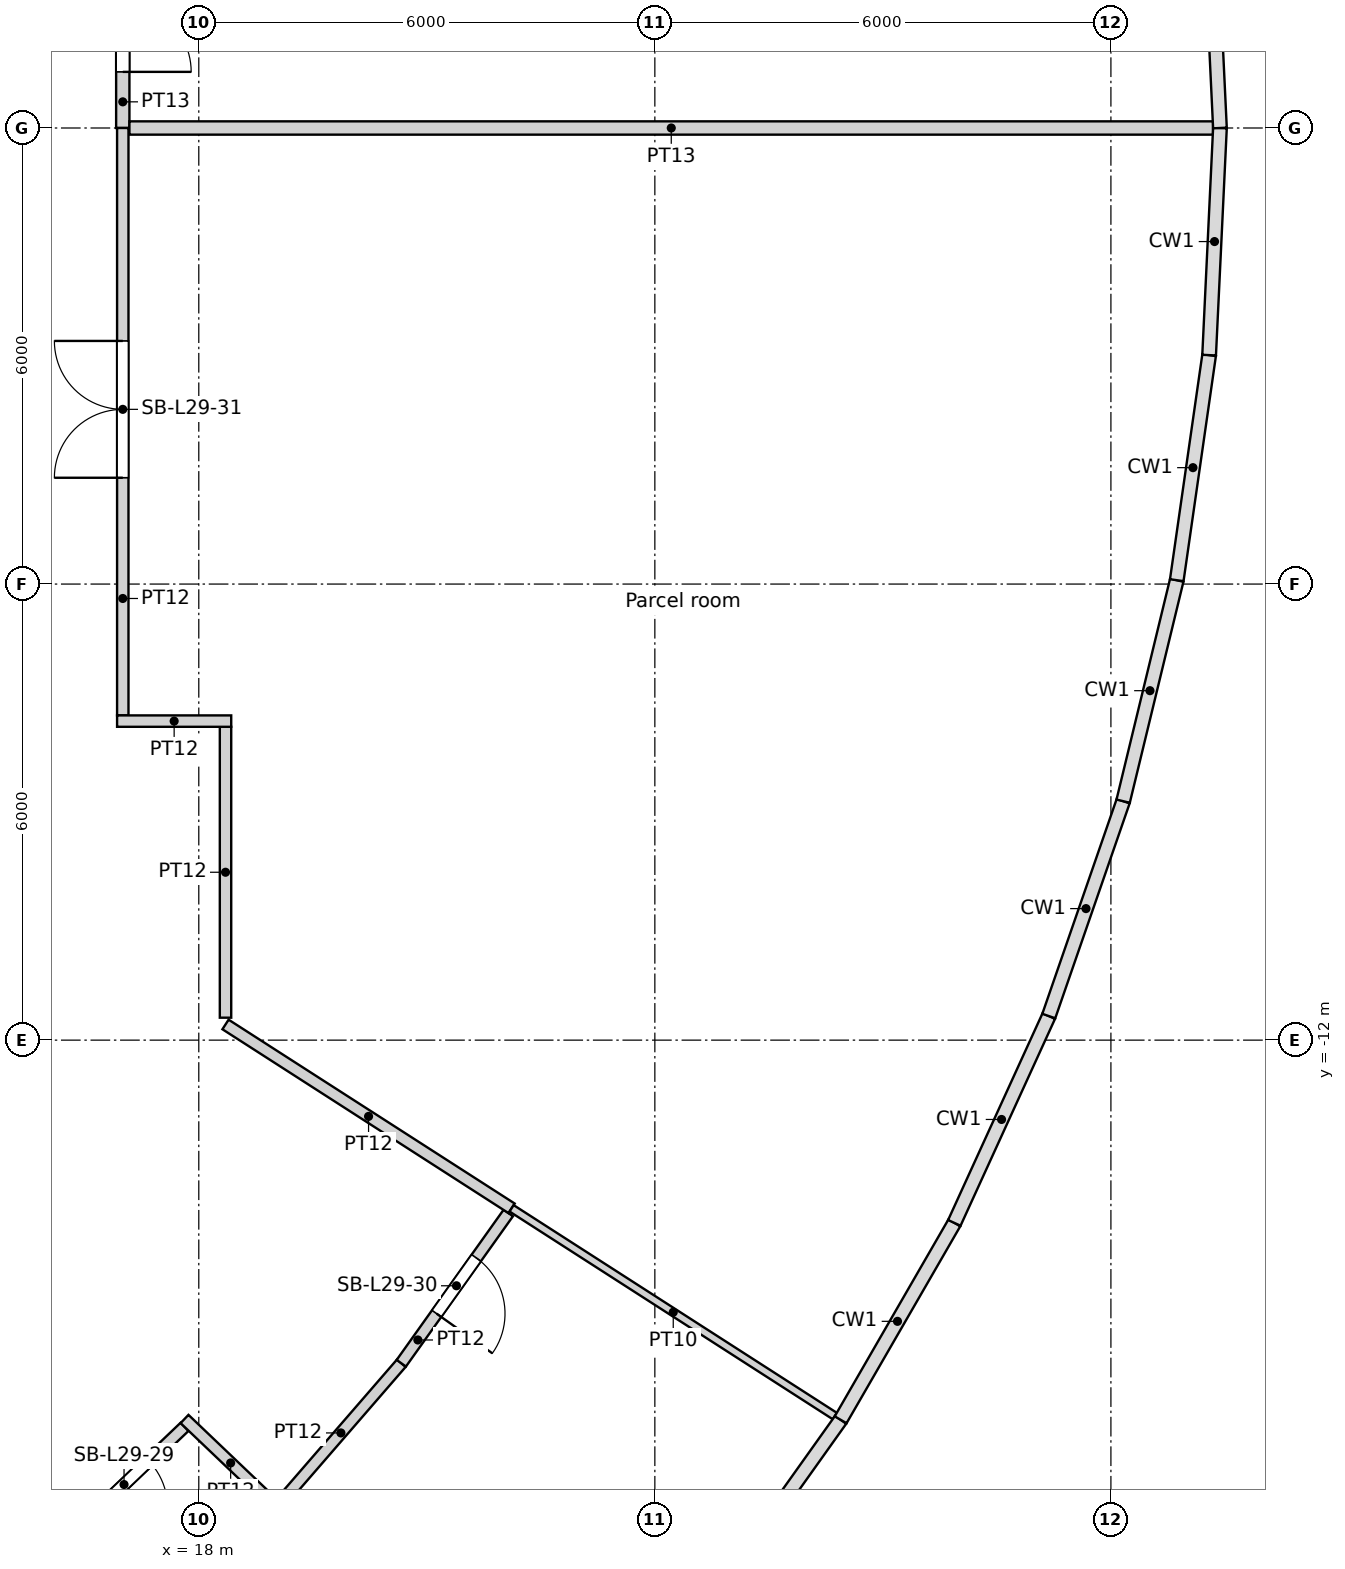
"""IFC4 building model, lengths in metres.
Left out: names, types, materials, properties, quantities, classifications, styles, units other than length and angle.
Written with IfcOpenShell. Run it as: python <this file> out.ifc"""

import sys

from ifc_helpers import new_model, si_unit, direction, frame, frame_2d, origin, origin_2d, place, context, subcontext, project, spatial, rectangle, circle, extrude, element, fill, save


model = new_model("IFC4")
c1 = context("Model", 3, precision=1e-05, world=origin(), true_north=direction((0.0, 1.0)))
c2 = subcontext(c1, "Body", "Model", "MODEL_VIEW")
j1 = project(units=[si_unit("LENGTHUNIT", "METRE"), si_unit("PLANEANGLEUNIT", "RADIAN")], contexts=[c1])
p1 = place(None, origin())
s1 = spatial("IfcSite", under=j1, at=p1, CompositionType="ELEMENT")
p2 = place(p1, origin())
s2 = spatial("IfcBuilding", under=s1, at=p2, CompositionType="ELEMENT")
p3 = place(p2, frame((0.0, 0.0, 114.6)))
s3 = spatial("IfcBuildingStorey", under=s2, at=p3, CompositionType="ELEMENT", Elevation=114.6)
for number, where, z_axis, x_axis in (
    (1, (30.275, 0.0, 0.0), (0.0, 0.0, 1.0), (1.0, 0.0, 0.0)),
    (2, (25.469, -16.368, 0.0), (0.0, 0.0, 1.0), (1.0, 0.0, 0.0)),
    (3, (28.106, -11.252, 0.0), (0.0, 0.0, 1.0), (1.0, 0.0, 0.0)),
    (4, (29.728, -5.729, 0.0), (0.0, 0.0, 1.0), (1.0, 0.0, 0.0)),
):
    element("IfcColumn", number, at=place(p3, frame(where, z_axis=z_axis, x_axis=x_axis)), inside=s3, PredefinedType="COLUMN", context=c2, shape_type="SweptSolid", body=[
        extrude(circle(Radius=0.6, at=origin_2d()), origin(), (0.0, 0.0, 1.0), 5.4),
    ])
for number, where, z_axis, x_axis in (
    (5, (24.548, 0.0, 0.0), (0.0, 0.0, 1.0), (1.0, 0.0, 0.0)),
    (6, (18.805, -15.779, 0.0), (0.0, 0.0, 1.0), (1.0, 0.0, 0.0)),
    (7, (21.937, -11.017, 0.0), (0.0, 0.0, 1.0), (1.0, 0.0, 0.0)),
    (8, (23.886, -5.661, 0.0), (0.0, 0.0, 1.0), (1.0, 0.0, 0.0)),
):
    element("IfcColumn", number, at=place(p3, frame(where, z_axis=z_axis, x_axis=x_axis)), inside=s3, PredefinedType="COLUMN", context=c2, shape_type="SweptSolid", body=[
        extrude(circle(Radius=0.65, at=origin_2d()), origin(), (0.0, 0.0, 1.0), 5.4),
    ])
for number, where, z_axis, x_axis in (
    (9, (18.822, 0.0, 0.0), (0.0, 0.0, 1.0), (1.0, 0.0, 0.0)),
    (10, (15.552, -10.603, 0.0), (0.0, 0.0, 1.0), (1.0, 0.0, 0.0)),
    (11, (17.986, -5.548, 0.0), (0.0, 0.0, 1.0), (1.0, 0.0, 0.0)),
):
    element("IfcColumn", number, at=place(p3, frame(where, z_axis=z_axis, x_axis=x_axis)), inside=s3, PredefinedType="COLUMN", context=c2, shape_type="SweptSolid", body=[
        extrude(circle(Radius=0.7, at=origin_2d()), origin(), (0.0, 0.0, 1.0), 5.4),
    ])
p4 = place(p3, frame((17.812, -17.088, 0.0), z_axis=(0.0, 0.0, 1.0), x_axis=(-0.723759987923, -0.690051795071, 0.0)))
e12 = element("IfcWall", 12, at=p4, inside=s3, PredefinedType="PARTITIONING", context=c2, shape_type="SweptSolid", body=[
    extrude(rectangle(XDim=2.274, YDim=0.15, at=frame_2d((1.137, 0.0))), origin(), (0.0, 0.0, 1.0), 4.0),
])
p5 = place(p4, frame((0.65, 0.0, 0.0)))
e13 = element("IfcOpeningElement", 13, at=p5, cuts=e12, PredefinedType="OPENING", context=c2, shape_type="SweptSolid", body=[
    extrude(rectangle(XDim=0.9, YDim=2.1, at=frame_2d((0.45, 1.05))), frame((0.0, 0.075, 0.0), z_axis=(0.0, -1.0, 0.0), x_axis=(1.0, 0.0, 0.0)), (0.0, 0.0, 1.0), 0.15),
])
p6 = place(p3, frame((17.0, 0.0, 0.0), z_axis=(0.0, 0.0, 1.0), x_axis=(0.0, -1.0, 0.0)))
e14 = element("IfcWall", 14, at=p6, inside=s3, PredefinedType="PARTITIONING", context=c2, shape_type="SweptSolid", body=[
    extrude(rectangle(XDim=7.728, YDim=0.15, at=frame_2d((3.864, 0.0))), origin(), (0.0, 0.0, 1.0), 4.0),
])
p7 = place(p6, frame((2.802, 0.0, 0.0)))
e15 = element("IfcOpeningElement", 15, at=p7, cuts=e14, PredefinedType="OPENING", context=c2, shape_type="SweptSolid", body=[
    extrude(rectangle(XDim=1.8, YDim=2.4, at=frame_2d((0.9, 1.2))), frame((0.0, 0.075, 0.0), z_axis=(0.0, -1.0, 0.0), x_axis=(1.0, 0.0, 0.0)), (0.0, 0.0, 1.0), 0.15),
])
p8 = place(p3, frame((17.0, 3.188, 0.0), z_axis=(0.0, 0.0, 1.0), x_axis=(0.0, -1.0, 0.0)))
e16 = element("IfcWall", 16, at=p8, inside=s3, PredefinedType="PARTITIONING", context=c2, shape_type="SweptSolid", body=[
    extrude(rectangle(XDim=3.188, YDim=0.175, at=frame_2d((1.594, 0.0))), origin(), (0.0, 0.0, 1.0), 4.0),
])
p9 = place(p8, frame((0.649, 0.0, 0.0)))
e17 = element("IfcOpeningElement", 17, at=p9, cuts=e16, PredefinedType="OPENING", context=c2, shape_type="SweptSolid", body=[
    extrude(rectangle(XDim=1.8, YDim=2.4, at=frame_2d((0.9, 1.2))), frame((0.0, 0.087, 0.0), z_axis=(0.0, -1.0, 0.0), x_axis=(1.0, 0.0, 0.0)), (0.0, 0.0, 1.0), 0.175),
])
p10 = place(p3, frame((18.352, -11.705, 0.0), z_axis=(0.0, 0.0, 1.0), x_axis=(0.0, 1.0, 0.0)))
e18 = element("IfcWall", 18, at=p10, inside=s3, PredefinedType="PARTITIONING", context=c2, shape_type="SweptSolid", body=[
    extrude(rectangle(XDim=3.827, YDim=0.15, at=frame_2d((1.913, 0.0))), origin(), (0.0, 0.0, 1.0), 4.0),
])
p11 = place(p3, frame((18.427, -7.803, 0.0), z_axis=(0.0, 0.0, 1.0), x_axis=(-1.0, 0.0, 0.0)))
e19 = element("IfcWall", 19, at=p11, inside=s3, PredefinedType="PARTITIONING", context=c2, shape_type="SweptSolid", body=[
    extrude(rectangle(XDim=1.501, YDim=0.15, at=frame_2d((0.751, 0.0))), origin(), (0.0, 0.0, 1.0), 4.0),
])
p12 = place(p3, frame((19.026, -18.141, 0.0), z_axis=(0.0, 0.0, 1.0), x_axis=(-0.723652981841, 0.69016401085, 0.0)))
e20 = element("IfcWall", 20, at=p12, inside=s3, PredefinedType="PARTITIONING", context=c2, shape_type="SweptSolid", body=[
    extrude(rectangle(XDim=1.677, YDim=0.15, at=frame_2d((0.838, 0.0))), origin(), (0.0, 0.0, 1.0), 4.0),
])
p13 = place(p3, frame((19.075, -18.085, 0.0), z_axis=(0.0, 0.0, 1.0), x_axis=(0.654800311432, 0.755801926531, 0.0)))
e21 = element("IfcWall", 21, at=p13, inside=s3, PredefinedType="PARTITIONING", context=c2, shape_type="SweptSolid", body=[
    extrude(rectangle(XDim=2.427, YDim=0.15, at=frame_2d((1.213, 0.0))), origin(), (0.0, 0.0, 1.0), 4.0),
])
p14 = place(p3, frame((22.072, -14.274, 0.0), z_axis=(0.0, 0.0, 1.0), x_axis=(-0.580047863214, -0.814582393856, 0.0)))
e22 = element("IfcWall", 22, at=p14, inside=s3, PredefinedType="PARTITIONING", context=c2, shape_type="SweptSolid", body=[
    extrude(rectangle(XDim=2.427, YDim=0.15, at=frame_2d((1.213, 0.0))), origin(), (0.0, 0.0, 1.0), 4.0),
])
p15 = place(p14, frame((0.726, 0.0, 0.0)))
e23 = element("IfcOpeningElement", 23, at=p15, cuts=e22, PredefinedType="OPENING", context=c2, shape_type="SweptSolid", body=[
    extrude(rectangle(XDim=0.9, YDim=2.1, at=frame_2d((0.45, 1.05))), frame((0.0, 0.075, 0.0), z_axis=(0.0, -1.0, 0.0), x_axis=(1.0, 0.0, 0.0)), (0.0, 0.0, 1.0), 0.15),
])
p16 = place(p3, frame((22.115, -14.213, 0.0), z_axis=(0.0, 0.0, 1.0), x_axis=(-0.841275975043, 0.540605895099, 0.0)))
e24 = element("IfcWall", 24, at=p16, inside=s3, PredefinedType="PARTITIONING", context=c2, shape_type="SweptSolid", body=[
    extrude(rectangle(XDim=4.474, YDim=0.15, at=frame_2d((2.237, 0.0))), origin(), (0.0, 0.0, 1.0), 4.0),
])
p17 = place(p3, frame((26.369, -16.946, 0.0), z_axis=(0.0, 0.0, 1.0), x_axis=(-0.841249071795, 0.540647758901, 0.0)))
e25 = element("IfcWall", 25, at=p17, inside=s3, PredefinedType="PARTITIONING", context=c2, shape_type="SweptSolid", body=[
    extrude(rectangle(XDim=5.056, YDim=0.1, at=frame_2d((2.528, 0.0))), origin(), (0.0, 0.0, 1.0), 4.0),
])
p18 = place(p3, frame((31.344, 0.0, 0.0), z_axis=(0.0, 0.0, 1.0), x_axis=(-1.0, 0.0, 0.0)))
e26 = element("IfcWall", 26, at=p18, inside=s3, PredefinedType="PARTITIONING", context=c2, shape_type="SweptSolid", body=[
    extrude(rectangle(XDim=14.257, YDim=0.175, at=frame_2d((7.128, 0.0))), origin(), (0.0, 0.0, 1.0), 4.0),
])
p19 = place(p9, origin())
e27 = element("IfcDoor", 27, at=p19, inside=s3, OperationType="DOUBLE_DOOR_SINGLE_SWING", PredefinedType="DOOR", context=c2, shape_type="SweptSolid", body=[
    extrude(rectangle(XDim=1.8, YDim=2.4, at=frame_2d((0.9, 1.2))), frame((0.0, 0.025, 0.0), z_axis=(0.0, -1.0, 0.0), x_axis=(1.0, 0.0, 0.0)), (0.0, 0.0, 1.0), 0.05),
])
fill(e17, e27)
p20 = place(p5, origin())
e28 = element("IfcDoor", 28, at=p20, inside=s3, OperationType="SINGLE_SWING_RIGHT", PredefinedType="DOOR", context=c2, shape_type="SweptSolid", body=[
    extrude(rectangle(XDim=0.9, YDim=2.1, at=frame_2d((0.45, 1.05))), frame((0.0, 0.025, 0.0), z_axis=(0.0, -1.0, 0.0), x_axis=(1.0, 0.0, 0.0)), (0.0, 0.0, 1.0), 0.05),
])
fill(e13, e28)
p21 = place(p15, origin())
e29 = element("IfcDoor", 29, at=p21, inside=s3, OperationType="SINGLE_SWING_RIGHT", PredefinedType="DOOR", context=c2, shape_type="SweptSolid", body=[
    extrude(rectangle(XDim=0.9, YDim=2.1, at=frame_2d((0.45, 1.05))), frame((0.0, 0.025, 0.0), z_axis=(0.0, -1.0, 0.0), x_axis=(1.0, 0.0, 0.0)), (0.0, 0.0, 1.0), 0.05),
])
fill(e23, e29)
p22 = place(p7, origin())
e30 = element("IfcDoor", 30, at=p22, inside=s3, OperationType="DOUBLE_DOOR_SINGLE_SWING", PredefinedType="DOOR", context=c2, shape_type="SweptSolid", body=[
    extrude(rectangle(XDim=1.8, YDim=2.4, at=frame_2d((0.9, 1.2))), frame((0.0, 0.025, 0.0), z_axis=(0.0, -1.0, 0.0), x_axis=(1.0, 0.0, 0.0)), (0.0, 0.0, 1.0), 0.05),
])
fill(e15, e30)
save(model, sys.argv[1])
